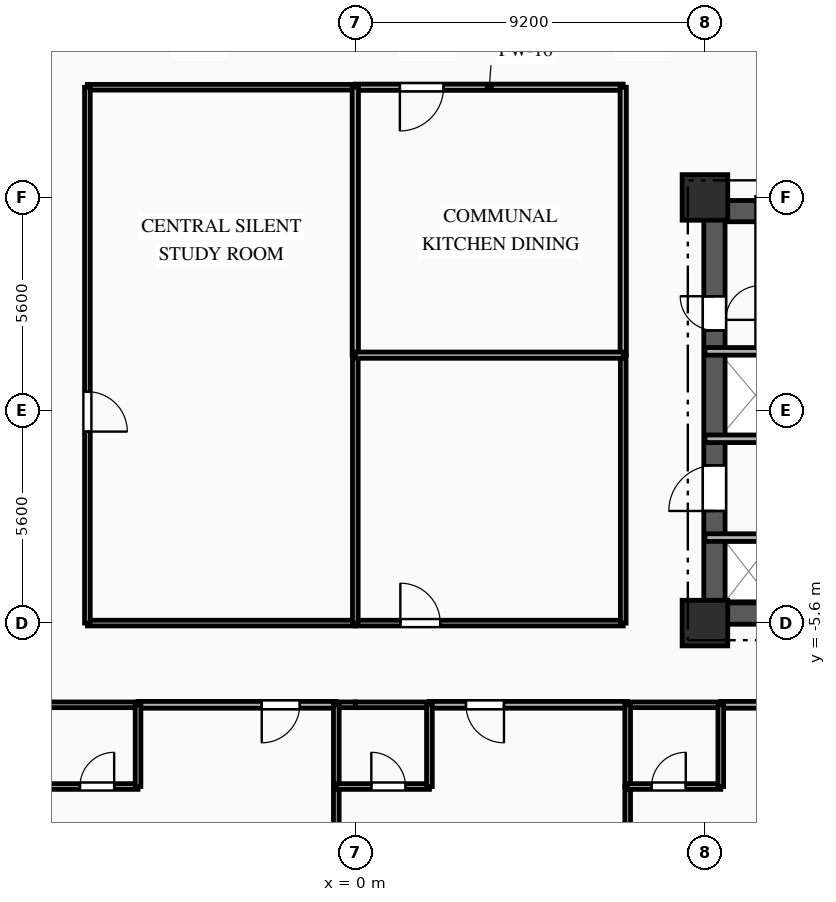
"""IFC4 building model, lengths in metres.
Left out: names, types, materials, properties, quantities, classifications, styles, units other than length and angle.
Written with IfcOpenShell. Run it as: python <this file> out.ifc"""

import sys

from ifc_helpers import new_model, si_unit, direction, frame, frame_2d, origin, origin_2d, place, context, subcontext, project, spatial, rectangle, extrude, element, fill, save


model = new_model("IFC4")
c1 = context("Model", 3, precision=1e-05, world=origin(), true_north=direction((0.0, 1.0)))
c2 = subcontext(c1, "Body", "Model", "MODEL_VIEW")
j1 = project(units=[si_unit("LENGTHUNIT", "METRE"), si_unit("PLANEANGLEUNIT", "RADIAN")], contexts=[c1])
p1 = place(None, origin())
s1 = spatial("IfcSite", under=j1, at=p1, CompositionType="ELEMENT")
p2 = place(p1, origin())
s2 = spatial("IfcBuilding", under=s1, at=p2, CompositionType="ELEMENT")
p3 = place(p2, frame((0.0, 0.0, 33.7)))
s3 = spatial("IfcBuildingStorey", under=s2, at=p3, CompositionType="ELEMENT", Elevation=33.7)
for number, where, z_axis, x_axis in (
    (1, (9.2, -5.6, 0.0), (0.0, 0.0, 1.0), (1.0, 0.0, 0.0)),
    (2, (9.2, 5.6, 0.0), (0.0, 0.0, 1.0), (1.0, 0.0, 0.0)),
):
    element("IfcColumn", number, at=place(p3, frame(where, z_axis=z_axis, x_axis=x_axis)), inside=s3, PredefinedType="COLUMN", context=c2, shape_type="SweptSolid", body=[
        extrude(rectangle(XDim=1.2, YDim=1.2, at=origin_2d()), origin(), (0.0, 0.0, 1.0), 3.35),
    ])
p4 = place(p3, frame((9.2, 5.24, 0.0), z_axis=(0.0, 0.0, 1.0), x_axis=(1.0, 0.0, 0.0)))
e3 = element("IfcWall", 3, at=p4, inside=s3, PredefinedType="SHEAR", context=c2, shape_type="SweptSolid", body=[
    extrude(rectangle(XDim=9.6, YDim=0.56, at=frame_2d((4.8, 0.0))), origin(), (0.0, 0.0, 1.0), 3.035),
])
p5 = place(p4, frame((6.95, 0.0, 0.0)))
e4 = element("IfcOpeningElement", 4, at=p5, cuts=e3, PredefinedType="OPENING", context=c2, shape_type="SweptSolid", body=[
    extrude(rectangle(XDim=1.1, YDim=2.15, at=frame_2d((0.55, 1.075))), frame((0.0, 0.29, 0.0), z_axis=(0.0, -1.0, 0.0), x_axis=(1.0, 0.0, 0.0)), (0.0, 0.0, 1.0), 0.58),
])
p6 = place(p4, frame((3.775, 0.0, 0.0)))
e5 = element("IfcOpeningElement", 5, at=p6, cuts=e3, PredefinedType="OPENING", context=c2, shape_type="SweptSolid", body=[
    extrude(rectangle(XDim=1.05, YDim=2.1, at=frame_2d((0.525, 1.05))), frame((0.0, 0.29, 0.0), z_axis=(0.0, -1.0, 0.0), x_axis=(1.0, 0.0, 0.0)), (0.0, 0.0, 1.0), 0.58),
])
p7 = place(p3, frame((9.2, -5.35, 0.0), z_axis=(0.0, 0.0, 1.0), x_axis=(1.0, 0.0, 0.0)))
e6 = element("IfcWall", 6, at=p7, inside=s3, PredefinedType="SHEAR", context=c2, shape_type="SweptSolid", body=[
    extrude(rectangle(XDim=9.6, YDim=0.56, at=frame_2d((4.8, 0.0))), origin(), (0.0, 0.0, 1.0), 3.035),
])
p8 = place(p7, frame((7.65, 0.0, 0.0)))
e7 = element("IfcOpeningElement", 7, at=p8, cuts=e6, PredefinedType="OPENING", context=c2, shape_type="SweptSolid", body=[
    extrude(rectangle(XDim=0.9, YDim=2.1, at=frame_2d((0.45, 1.05))), frame((0.0, 0.29, 0.0), z_axis=(0.0, -1.0, 0.0), x_axis=(1.0, 0.0, 0.0)), (0.0, 0.0, 1.0), 0.58),
])
p9 = place(p3, frame((9.45, -5.05, 0.0), z_axis=(0.0, 0.0, 1.0), x_axis=(0.0, 1.0, 0.0)))
e8 = element("IfcWall", 8, at=p9, inside=s3, PredefinedType="SHEAR", context=c2, shape_type="SweptSolid", body=[
    extrude(rectangle(XDim=10.1, YDim=0.56, at=frame_2d((5.05, 0.0))), origin(), (0.0, 0.0, 1.0), 3.035),
])
p10 = place(p9, frame((7.15, 0.0, 0.0)))
e9 = element("IfcOpeningElement", 9, at=p10, cuts=e8, PredefinedType="OPENING", context=c2, shape_type="SweptSolid", body=[
    extrude(rectangle(XDim=0.9, YDim=2.1, at=frame_2d((0.45, 1.05))), frame((0.0, 0.29, 0.0), z_axis=(0.0, -1.0, 0.0), x_axis=(1.0, 0.0, 0.0)), (0.0, 0.0, 1.0), 0.58),
])
p11 = place(p9, frame((2.4, 0.0, 0.0)))
e10 = element("IfcOpeningElement", 10, at=p11, cuts=e8, PredefinedType="OPENING", context=c2, shape_type="SweptSolid", body=[
    extrude(rectangle(XDim=1.2, YDim=2.15, at=frame_2d((0.6, 1.075))), frame((0.0, 0.29, 0.0), z_axis=(0.0, -1.0, 0.0), x_axis=(1.0, 0.0, 0.0)), (0.0, 0.0, 1.0), 0.58),
])
p12 = place(p3, frame((9.2, -3.35, 0.0), z_axis=(0.0, 0.0, 1.0), x_axis=(1.0, 0.0, 0.0)))
e11 = element("IfcWall", 11, at=p12, inside=s3, PredefinedType="PARTITIONING", context=c2, shape_type="SweptSolid", body=[
    extrude(rectangle(XDim=1.88, YDim=0.2, at=frame_2d((0.94, 0.0))), origin(), (0.0, 0.0, 1.0), 2.75),
])
p13 = place(p3, frame((11.46, -0.75, 0.0), z_axis=(0.0, 0.0, 1.0), x_axis=(-1.0, 0.0, 0.0)))
e12 = element("IfcWall", 12, at=p13, inside=s3, PredefinedType="PARTITIONING", context=c2, shape_type="SweptSolid", body=[
    extrude(rectangle(XDim=2.26, YDim=0.2, at=frame_2d((1.13, 0.0))), origin(), (0.0, 0.0, 1.0), 3.035),
])
p14 = place(p3, frame((0.0, 8.5, 0.0), z_axis=(0.0, 0.0, 1.0), x_axis=(-1.0, 0.0, 0.0)))
e13 = element("IfcWall", 13, at=p14, inside=s3, PredefinedType="PARTITIONING", context=c2, shape_type="SweptSolid", body=[
    extrude(rectangle(XDim=7.05, YDim=0.15, at=frame_2d((3.525, 0.0))), origin(), (0.0, 0.0, 1.0), 3.035),
])
p15 = place(p3, frame((7.05, 8.5, 0.0), z_axis=(0.0, 0.0, 1.0), x_axis=(-1.0, 0.0, 0.0)))
e14 = element("IfcWall", 14, at=p15, inside=s3, PredefinedType="PARTITIONING", context=c2, shape_type="SweptSolid", body=[
    extrude(rectangle(XDim=7.05, YDim=0.165, at=frame_2d((3.525, 0.0))), origin(), (0.0, 0.0, 1.0), 3.035),
])
p16 = place(p15, frame((4.728, 0.0, 0.0)))
e15 = element("IfcOpeningElement", 15, at=p16, cuts=e14, PredefinedType="OPENING", context=c2, shape_type="SweptSolid", body=[
    extrude(rectangle(XDim=1.15, YDim=2.15, at=frame_2d((0.575, 1.075))), frame((0.0, 0.093, 0.0), z_axis=(0.0, -1.0, 0.0), x_axis=(1.0, 0.0, 0.0)), (0.0, 0.0, 1.0), 0.185),
])
p17 = place(p3, frame((-0.5, -7.75, 0.0), z_axis=(0.0, 0.0, 1.0), x_axis=(-1.0, 0.0, 0.0)))
e16 = element("IfcWall", 16, at=p17, inside=s3, PredefinedType="PARTITIONING", context=c2, shape_type="SweptSolid", body=[
    extrude(rectangle(XDim=5.217, YDim=0.18, at=frame_2d((2.608, 0.0))), origin(), (0.0, 0.0, 1.0), 3.035),
])
p18 = place(p17, frame((0.962, 0.0, 0.0)))
e17 = element("IfcOpeningElement", 17, at=p18, cuts=e16, PredefinedType="OPENING", context=c2, shape_type="SweptSolid", body=[
    extrude(rectangle(XDim=1.0, YDim=2.15, at=frame_2d((0.5, 1.075))), frame((0.0, 0.1, 0.0), z_axis=(0.0, -1.0, 0.0), x_axis=(1.0, 0.0, 0.0)), (0.0, 0.0, 1.0), 0.2),
])
p19 = place(p3, frame((-5.717, -7.75, 0.0), z_axis=(0.0, 0.0, 1.0), x_axis=(-1.0, 0.0, 0.0)))
e18 = element("IfcWall", 18, at=p19, inside=s3, PredefinedType="PLUMBINGWALL", context=c2, shape_type="SweptSolid", body=[
    extrude(rectangle(XDim=2.45, YDim=0.15, at=frame_2d((1.225, 0.0))), origin(), (0.0, 0.0, 1.0), 3.035),
])
p20 = place(p3, frame((0.0, -7.75, 0.0), z_axis=(0.0, 0.0, 1.0), x_axis=(-1.0, 0.0, 0.0)))
e19 = element("IfcWall", 19, at=p20, inside=s3, PredefinedType="PLUMBINGWALL", context=c2, shape_type="SweptSolid", body=[
    extrude(rectangle(XDim=0.5, YDim=0.15, at=frame_2d((0.25, 0.0))), origin(), (0.0, 0.0, 1.0), 3.035),
])
p21 = place(p3, frame((-7.05, -5.6, 0.0), z_axis=(0.0, 0.0, 1.0), x_axis=(1.0, 0.0, 0.0)))
e20 = element("IfcWall", 20, at=p21, inside=s3, PredefinedType="PARTITIONING", context=c2, shape_type="SweptSolid", body=[
    extrude(rectangle(XDim=7.05, YDim=0.15, at=frame_2d((3.525, 0.0))), origin(), (0.0, 0.0, 1.0), 2.52),
])
p22 = place(p3, frame((7.167, -7.75, 0.0), z_axis=(0.0, 0.0, 1.0), x_axis=(-1.0, 0.0, 0.0)))
e21 = element("IfcWall", 21, at=p22, inside=s3, PredefinedType="PARTITIONING", context=c2, shape_type="SweptSolid", body=[
    extrude(rectangle(XDim=5.217, YDim=0.18, at=frame_2d((2.608, 0.0))), origin(), (0.0, 0.0, 1.0), 3.035),
])
p23 = place(p22, frame((3.255, 0.0, 0.0)))
e22 = element("IfcOpeningElement", 22, at=p23, cuts=e21, PredefinedType="OPENING", context=c2, shape_type="SweptSolid", body=[
    extrude(rectangle(XDim=1.0, YDim=2.15, at=frame_2d((0.5, 1.075))), frame((0.0, 0.1, 0.0), z_axis=(0.0, -1.0, 0.0), x_axis=(1.0, 0.0, 0.0)), (0.0, 0.0, 1.0), 0.2),
])
p24 = place(p3, frame((1.95, -7.75, 0.0), z_axis=(0.0, 0.0, 1.0), x_axis=(-1.0, 0.0, 0.0)))
e23 = element("IfcWall", 23, at=p24, inside=s3, PredefinedType="PLUMBINGWALL", context=c2, shape_type="SweptSolid", body=[
    extrude(rectangle(XDim=1.95, YDim=0.15, at=frame_2d((0.975, 0.0))), origin(), (0.0, 0.0, 1.0), 3.035),
])
p25 = place(p3, frame((14.833, -7.75, 0.0), z_axis=(0.0, 0.0, 1.0), x_axis=(-1.0, 0.0, 0.0)))
e24 = element("IfcWall", 24, at=p25, inside=s3, PredefinedType="PARTITIONING", context=c2, shape_type="SweptSolid", body=[
    extrude(rectangle(XDim=5.216, YDim=0.18, at=frame_2d((2.608, 0.0))), origin(), (0.0, 0.0, 1.0), 3.035),
])
p26 = place(p25, frame((0.962, 0.0, 0.0)))
e25 = element("IfcOpeningElement", 25, at=p26, cuts=e24, PredefinedType="OPENING", context=c2, shape_type="SweptSolid", body=[
    extrude(rectangle(XDim=1.0, YDim=2.15, at=frame_2d((0.5, 1.075))), frame((0.0, 0.1, 0.0), z_axis=(0.0, -1.0, 0.0), x_axis=(1.0, 0.0, 0.0)), (0.0, 0.0, 1.0), 0.2),
])
p27 = place(p3, frame((9.617, -7.75, 0.0), z_axis=(0.0, 0.0, 1.0), x_axis=(-1.0, 0.0, 0.0)))
e26 = element("IfcWall", 26, at=p27, inside=s3, PredefinedType="PLUMBINGWALL", context=c2, shape_type="SweptSolid", body=[
    extrude(rectangle(XDim=2.45, YDim=0.15, at=frame_2d((1.225, 0.0))), origin(), (0.0, 0.0, 1.0), 3.035),
])
p28 = place(p3, frame((0.0, -5.6, 0.0), z_axis=(0.0, 0.0, 1.0), x_axis=(1.0, 0.0, 0.0)))
e27 = element("IfcWall", 27, at=p28, inside=s3, PredefinedType="PARTITIONING", context=c2, shape_type="SweptSolid", body=[
    extrude(rectangle(XDim=7.05, YDim=0.15, at=frame_2d((3.525, 0.0))), origin(), (0.0, 0.0, 1.0), 2.52),
])
p29 = place(p28, frame((1.185, 0.0, 0.0)))
e28 = element("IfcOpeningElement", 28, at=p29, cuts=e27, PredefinedType="OPENING", context=c2, shape_type="SweptSolid", body=[
    extrude(rectangle(XDim=1.05, YDim=2.15, at=frame_2d((0.525, 1.075))), frame((0.0, 0.085, 0.0), z_axis=(0.0, -1.0, 0.0), x_axis=(1.0, 0.0, 0.0)), (0.0, 0.0, 1.0), 0.17),
])
p30 = place(p3, frame((-7.05, 8.5, 0.0), z_axis=(0.0, 0.0, 1.0), x_axis=(0.0, -1.0, 0.0)))
e29 = element("IfcWall", 29, at=p30, inside=s3, PredefinedType="PARTITIONING", context=c2, shape_type="SweptSolid", body=[
    extrude(rectangle(XDim=14.1, YDim=0.15, at=frame_2d((7.05, 0.0))), origin(), (0.0, 0.0, 1.0), 3.035),
])
p31 = place(p30, frame((8.011, 0.0, 0.0)))
e30 = element("IfcOpeningElement", 30, at=p31, cuts=e29, PredefinedType="OPENING", context=c2, shape_type="SweptSolid", body=[
    extrude(rectangle(XDim=1.05, YDim=2.15, at=frame_2d((0.525, 1.075))), frame((0.0, 0.085, 0.0), z_axis=(0.0, -1.0, 0.0), x_axis=(1.0, 0.0, 0.0)), (0.0, 0.0, 1.0), 0.17),
])
p32 = place(p3, frame((7.05, -5.6, 0.0), z_axis=(0.0, 0.0, 1.0), x_axis=(0.0, 1.0, 0.0)))
e31 = element("IfcWall", 31, at=p32, inside=s3, PredefinedType="PARTITIONING", context=c2, shape_type="SweptSolid", body=[
    extrude(rectangle(XDim=7.05, YDim=0.15, at=frame_2d((3.525, 0.0))), origin(), (0.0, 0.0, 1.0), 3.035),
])
p33 = place(p3, frame((7.05, 1.45, 0.0), z_axis=(0.0, 0.0, 1.0), x_axis=(0.0, 1.0, 0.0)))
e32 = element("IfcWall", 32, at=p33, inside=s3, PredefinedType="PARTITIONING", context=c2, shape_type="SweptSolid", body=[
    extrude(rectangle(XDim=7.05, YDim=0.165, at=frame_2d((3.525, 0.0))), origin(), (0.0, 0.0, 1.0), 3.035),
])
p34 = place(p3, frame((-8.167, -9.9, 0.0), z_axis=(0.0, 0.0, 1.0), x_axis=(1.0, 0.0, 0.0)))
e33 = element("IfcWall", 33, at=p34, inside=s3, PredefinedType="PLUMBINGWALL", context=c2, shape_type="SweptSolid", body=[
    extrude(rectangle(XDim=2.45, YDim=0.15, at=frame_2d((1.225, 0.0))), origin(), (0.0, 0.0, 1.0), 3.035),
])
p35 = place(p34, frame((0.921, 0.0, 0.0)))
e34 = element("IfcOpeningElement", 34, at=p35, cuts=e33, PredefinedType="OPENING", context=c2, shape_type="SweptSolid", body=[
    extrude(rectangle(XDim=0.9, YDim=2.1, at=frame_2d((0.45, 1.05))), frame((0.0, 0.085, 0.0), z_axis=(0.0, -1.0, 0.0), x_axis=(1.0, 0.0, 0.0)), (0.0, 0.0, 1.0), 0.17),
])
p36 = place(p3, frame((-5.717, -9.9, 0.0), z_axis=(0.0, 0.0, 1.0), x_axis=(0.0, 1.0, 0.0)))
e35 = element("IfcWall", 35, at=p36, inside=s3, PredefinedType="PLUMBINGWALL", context=c2, shape_type="SweptSolid", body=[
    extrude(rectangle(XDim=2.15, YDim=0.15, at=frame_2d((1.075, 0.0))), origin(), (0.0, 0.0, 1.0), 3.035),
])
p37 = place(p3, frame((-0.5, -9.9, 0.0), z_axis=(0.0, 0.0, 1.0), x_axis=(0.0, -1.0, 0.0)))
e36 = element("IfcWall", 36, at=p37, inside=s3, PredefinedType="PARTITIONING", context=c2, shape_type="SweptSolid", body=[
    extrude(rectangle(XDim=9.5, YDim=0.15, at=frame_2d((4.75, 0.0))), origin(), (0.0, 0.0, 1.0), 3.035),
])
p38 = place(p3, frame((-0.5, -7.75, 0.0), z_axis=(0.0, 0.0, 1.0), x_axis=(0.0, -1.0, 0.0)))
e37 = element("IfcWall", 37, at=p38, inside=s3, PredefinedType="PLUMBINGWALL", context=c2, shape_type="SweptSolid", body=[
    extrude(rectangle(XDim=2.15, YDim=0.15, at=frame_2d((1.075, 0.0))), origin(), (0.0, 0.0, 1.0), 3.035),
])
p39 = place(p3, frame((-0.5, -9.9, 0.0), z_axis=(0.0, 0.0, 1.0), x_axis=(1.0, 0.0, 0.0)))
e38 = element("IfcWall", 38, at=p39, inside=s3, PredefinedType="PLUMBINGWALL", context=c2, shape_type="SweptSolid", body=[
    extrude(rectangle(XDim=2.45, YDim=0.15, at=frame_2d((1.225, 0.0))), origin(), (0.0, 0.0, 1.0), 3.035),
])
p40 = place(p39, frame((0.921, 0.0, 0.0)))
e39 = element("IfcOpeningElement", 39, at=p40, cuts=e38, PredefinedType="OPENING", context=c2, shape_type="SweptSolid", body=[
    extrude(rectangle(XDim=0.9, YDim=2.1, at=frame_2d((0.45, 1.05))), frame((0.0, 0.085, 0.0), z_axis=(0.0, -1.0, 0.0), x_axis=(1.0, 0.0, 0.0)), (0.0, 0.0, 1.0), 0.17),
])
p41 = place(p3, frame((1.95, -9.9, 0.0), z_axis=(0.0, 0.0, 1.0), x_axis=(0.0, 1.0, 0.0)))
e40 = element("IfcWall", 40, at=p41, inside=s3, PredefinedType="PLUMBINGWALL", context=c2, shape_type="SweptSolid", body=[
    extrude(rectangle(XDim=2.15, YDim=0.15, at=frame_2d((1.075, 0.0))), origin(), (0.0, 0.0, 1.0), 3.035),
])
p42 = place(p3, frame((7.167, -9.9, 0.0), z_axis=(0.0, 0.0, 1.0), x_axis=(0.0, -1.0, 0.0)))
e41 = element("IfcWall", 41, at=p42, inside=s3, PredefinedType="PARTITIONING", context=c2, shape_type="SweptSolid", body=[
    extrude(rectangle(XDim=9.5, YDim=0.15, at=frame_2d((4.75, 0.0))), origin(), (0.0, 0.0, 1.0), 3.035),
])
p43 = place(p3, frame((7.167, -7.75, 0.0), z_axis=(0.0, 0.0, 1.0), x_axis=(0.0, -1.0, 0.0)))
e42 = element("IfcWall", 42, at=p43, inside=s3, PredefinedType="PLUMBINGWALL", context=c2, shape_type="SweptSolid", body=[
    extrude(rectangle(XDim=2.15, YDim=0.15, at=frame_2d((1.075, 0.0))), origin(), (0.0, 0.0, 1.0), 3.035),
])
p44 = place(p3, frame((7.167, -9.9, 0.0), z_axis=(0.0, 0.0, 1.0), x_axis=(1.0, 0.0, 0.0)))
e43 = element("IfcWall", 43, at=p44, inside=s3, PredefinedType="PLUMBINGWALL", context=c2, shape_type="SweptSolid", body=[
    extrude(rectangle(XDim=2.45, YDim=0.15, at=frame_2d((1.225, 0.0))), origin(), (0.0, 0.0, 1.0), 3.035),
])
p45 = place(p44, frame((0.629, 0.0, 0.0)))
e44 = element("IfcOpeningElement", 44, at=p45, cuts=e43, PredefinedType="OPENING", context=c2, shape_type="SweptSolid", body=[
    extrude(rectangle(XDim=0.9, YDim=2.1, at=frame_2d((0.45, 1.05))), frame((0.0, 0.085, 0.0), z_axis=(0.0, -1.0, 0.0), x_axis=(1.0, 0.0, 0.0)), (0.0, 0.0, 1.0), 0.17),
])
p46 = place(p3, frame((9.617, -9.9, 0.0), z_axis=(0.0, 0.0, 1.0), x_axis=(0.0, 1.0, 0.0)))
e45 = element("IfcWall", 45, at=p46, inside=s3, PredefinedType="PLUMBINGWALL", context=c2, shape_type="SweptSolid", body=[
    extrude(rectangle(XDim=2.15, YDim=0.15, at=frame_2d((1.075, 0.0))), origin(), (0.0, 0.0, 1.0), 3.035),
])
p47 = place(p3, frame((0.0, 1.45, 0.0), z_axis=(0.0, 0.0, 1.0), x_axis=(0.0, -1.0, 0.0)))
e46 = element("IfcWall", 46, at=p47, inside=s3, PredefinedType="PARTITIONING", context=c2, shape_type="SweptSolid", body=[
    extrude(rectangle(XDim=7.05, YDim=0.15, at=frame_2d((3.525, 0.0))), origin(), (0.0, 0.0, 1.0), 3.035),
])
for number, where, z_axis, x_axis in (
    (47, (0.0, 8.5, 0.0), (0.0, 0.0, 1.0), (0.0, -1.0, 0.0)),
    (48, (0.0, 1.45, 0.0), (0.0, 0.0, 1.0), (1.0, 0.0, 0.0)),
):
    element("IfcWall", number, at=place(p3, frame(where, z_axis=z_axis, x_axis=x_axis)), inside=s3, PredefinedType="PARTITIONING", context=c2, shape_type="SweptSolid", body=[
        extrude(rectangle(XDim=7.05, YDim=0.165, at=frame_2d((3.525, 0.0))), origin(), (0.0, 0.0, 1.0), 3.035),
    ])
p48 = place(p3, frame((9.2, 1.55, 0.0), z_axis=(0.0, 0.0, 1.0), x_axis=(1.0, 0.0, 0.0)))
e49 = element("IfcWall", 49, at=p48, inside=s3, PredefinedType="PARTITIONING", context=c2, shape_type="SweptSolid", body=[
    extrude(rectangle(XDim=5.82, YDim=0.2, at=frame_2d((2.91, 0.0))), origin(), (0.0, 0.0, 1.0), 3.035),
])
p49 = place(p10, origin())
e50 = element("IfcDoor", 50, at=p49, inside=s3, OperationType="SINGLE_SWING_RIGHT", PredefinedType="DOOR", context=c2, shape_type="SweptSolid", body=[
    extrude(rectangle(XDim=0.9, YDim=2.1, at=frame_2d((0.45, 1.05))), frame((0.0, 0.025, 0.0), z_axis=(0.0, -1.0, 0.0), x_axis=(1.0, 0.0, 0.0)), (0.0, 0.0, 1.0), 0.05),
])
fill(e9, e50)
p50 = place(p11, origin())
e51 = element("IfcDoor", 51, at=p50, inside=s3, OperationType="SINGLE_SWING_LEFT", PredefinedType="DOOR", context=c2, shape_type="SweptSolid", body=[
    extrude(rectangle(XDim=1.2, YDim=2.15, at=frame_2d((0.6, 1.075))), frame((0.0, 0.025, 0.0), z_axis=(0.0, -1.0, 0.0), x_axis=(1.0, 0.0, 0.0)), (0.0, 0.0, 1.0), 0.05),
])
fill(e10, e51)
p51 = place(p16, origin())
e52 = element("IfcDoor", 52, at=p51, inside=s3, OperationType="SINGLE_SWING_RIGHT", PredefinedType="DOOR", context=c2, shape_type="SweptSolid", body=[
    extrude(rectangle(XDim=1.15, YDim=2.15, at=frame_2d((0.575, 1.075))), frame((0.0, 0.025, 0.0), z_axis=(0.0, -1.0, 0.0), x_axis=(1.0, 0.0, 0.0)), (0.0, 0.0, 1.0), 0.05),
])
fill(e15, e52)
p52 = place(p18, origin())
e53 = element("IfcDoor", 53, at=p52, inside=s3, OperationType="SINGLE_SWING_RIGHT", PredefinedType="DOOR", context=c2, shape_type="SweptSolid", body=[
    extrude(rectangle(XDim=1.0, YDim=2.15, at=frame_2d((0.5, 1.075))), frame((0.0, 0.025, 0.0), z_axis=(0.0, -1.0, 0.0), x_axis=(1.0, 0.0, 0.0)), (0.0, 0.0, 1.0), 0.05),
])
fill(e17, e53)
p53 = place(p23, origin())
e54 = element("IfcDoor", 54, at=p53, inside=s3, OperationType="SINGLE_SWING_LEFT", PredefinedType="DOOR", context=c2, shape_type="SweptSolid", body=[
    extrude(rectangle(XDim=1.0, YDim=2.15, at=frame_2d((0.5, 1.075))), frame((0.0, 0.025, 0.0), z_axis=(0.0, -1.0, 0.0), x_axis=(1.0, 0.0, 0.0)), (0.0, 0.0, 1.0), 0.05),
])
fill(e22, e54)
p54 = place(p29, origin())
e55 = element("IfcDoor", 55, at=p54, inside=s3, OperationType="SINGLE_SWING_LEFT", PredefinedType="DOOR", context=c2, shape_type="SweptSolid", body=[
    extrude(rectangle(XDim=1.05, YDim=2.15, at=frame_2d((0.525, 1.075))), frame((0.0, 0.025, 0.0), z_axis=(0.0, -1.0, 0.0), x_axis=(1.0, 0.0, 0.0)), (0.0, 0.0, 1.0), 0.05),
])
fill(e28, e55)
p55 = place(p31, origin())
e56 = element("IfcDoor", 56, at=p55, inside=s3, OperationType="SINGLE_SWING_RIGHT", PredefinedType="DOOR", context=c2, shape_type="SweptSolid", body=[
    extrude(rectangle(XDim=1.05, YDim=2.15, at=frame_2d((0.525, 1.075))), frame((0.0, 0.025, 0.0), z_axis=(0.0, -1.0, 0.0), x_axis=(1.0, 0.0, 0.0)), (0.0, 0.0, 1.0), 0.05),
])
fill(e30, e56)
p56 = place(p35, origin())
e57 = element("IfcDoor", 57, at=p56, inside=s3, OperationType="SINGLE_SWING_RIGHT", PredefinedType="DOOR", context=c2, shape_type="SweptSolid", body=[
    extrude(rectangle(XDim=0.9, YDim=2.1, at=frame_2d((0.45, 1.05))), frame((0.0, 0.025, 0.0), z_axis=(0.0, -1.0, 0.0), x_axis=(1.0, 0.0, 0.0)), (0.0, 0.0, 1.0), 0.05),
])
fill(e34, e57)
p57 = place(p40, origin())
e58 = element("IfcDoor", 58, at=p57, inside=s3, OperationType="SINGLE_SWING_LEFT", PredefinedType="DOOR", context=c2, shape_type="SweptSolid", body=[
    extrude(rectangle(XDim=0.9, YDim=2.1, at=frame_2d((0.45, 1.05))), frame((0.0, 0.025, 0.0), z_axis=(0.0, -1.0, 0.0), x_axis=(1.0, 0.0, 0.0)), (0.0, 0.0, 1.0), 0.05),
])
fill(e39, e58)
p58 = place(p45, origin())
e59 = element("IfcDoor", 59, at=p58, inside=s3, OperationType="SINGLE_SWING_RIGHT", PredefinedType="DOOR", context=c2, shape_type="SweptSolid", body=[
    extrude(rectangle(XDim=0.9, YDim=2.1, at=frame_2d((0.45, 1.05))), frame((0.0, 0.025, 0.0), z_axis=(0.0, -1.0, 0.0), x_axis=(1.0, 0.0, 0.0)), (0.0, 0.0, 1.0), 0.05),
])
fill(e44, e59)
save(model, sys.argv[1])
